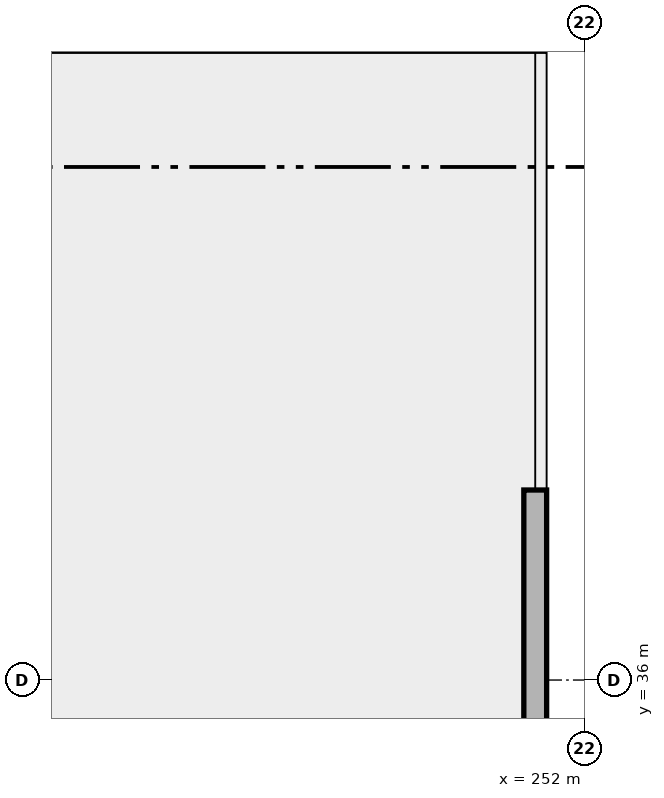
"""IFC4 building model, lengths in metres.
Left out: names, types, materials, properties, quantities, classifications, styles, units other than length and angle.
Written with IfcOpenShell. Run it as: python <this file> out.ifc"""

import sys

from ifc_helpers import new_model, si_unit, direction, frame, frame_2d, origin, place, context, subcontext, project, spatial, rectangle, extrude, element, save


model = new_model("IFC4")
c1 = context("Model", 3, precision=1e-05, world=origin(), true_north=direction((0.0, 1.0)))
c2 = subcontext(c1, "Body", "Model", "MODEL_VIEW")
j1 = project(units=[si_unit("LENGTHUNIT", "METRE"), si_unit("PLANEANGLEUNIT", "RADIAN")], contexts=[c1])
p1 = place(None, origin())
s1 = spatial("IfcSite", under=j1, at=p1, CompositionType="ELEMENT")
p2 = place(p1, origin())
s2 = spatial("IfcBuilding", under=s1, at=p2, CompositionType="ELEMENT")
p3 = place(p2, origin())
s3 = spatial("IfcBuildingStorey", under=s2, at=p3, CompositionType="ELEMENT", Elevation=0.0)
p4 = place(p3, frame((251.35, 38.5, 0.0), z_axis=(0.0, 0.0, 1.0), x_axis=(0.0, -1.0, 0.0)))
e1 = element("IfcWall", 1, at=p4, inside=s3, PredefinedType="SOLIDWALL", context=c2, shape_type="SweptSolid", body=[
    extrude(rectangle(XDim=15.0, YDim=0.3, at=frame_2d((7.5, 0.0))), origin(), (0.0, 0.0, 1.0), 3.8),
])
p5 = place(p4, frame((4.2, 0.0, 0.0)))
e2 = element("IfcOpeningElement", 2, at=p5, cuts=e1, PredefinedType="OPENING", context=c2, shape_type="SweptSolid", body=[
    extrude(rectangle(XDim=6.5, YDim=3.2, at=frame_2d((3.25, 1.6))), frame((0.0, 0.165, 0.0), z_axis=(0.0, -1.0, 0.0), x_axis=(1.0, 0.0, 0.0)), (0.0, 0.0, 1.0), 0.33),
])
save(model, sys.argv[1])
